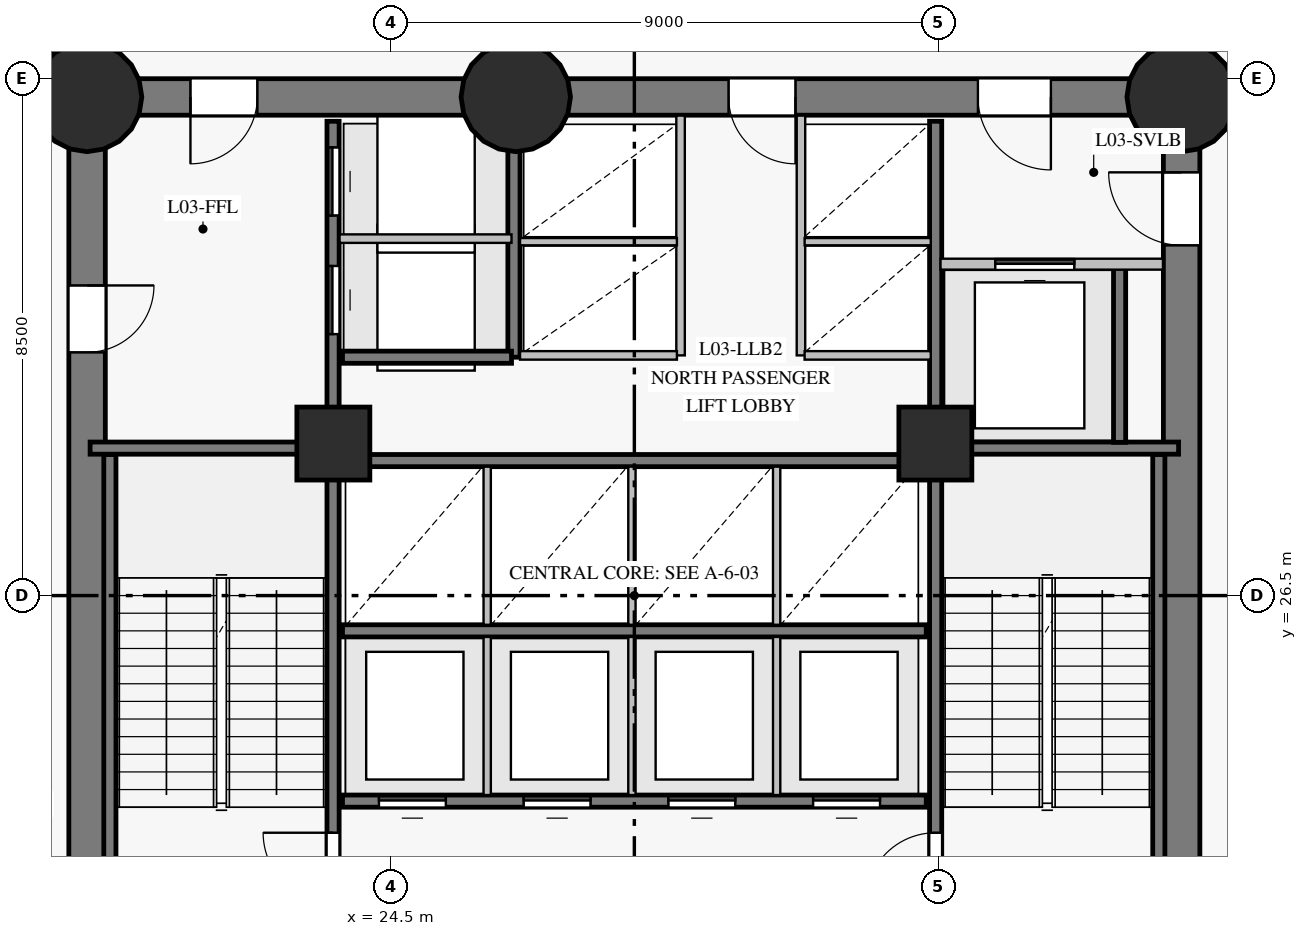
"""IFC4 building model, lengths in metres.
Left out: names, types, materials, properties, quantities, classifications, styles, units other than length and angle.
Written with IfcOpenShell. Run it as: python <this file> out.ifc"""

import sys

from ifc_helpers import new_model, si_unit, direction, frame, frame_2d, origin, origin_with_axes, origin_2d, place, context, subcontext, project, spatial, rectangle, circle, extrude, source, transform, mapped, element, fill, save


model = new_model("IFC4")
c1 = context("Model", 3, precision=1e-05, world=origin(), true_north=direction((0.0, 1.0)))
c2 = subcontext(c1, "Body", "Model", "MODEL_VIEW")
j1 = project(units=[si_unit("LENGTHUNIT", "METRE"), si_unit("PLANEANGLEUNIT", "RADIAN")], contexts=[c1])
p1 = place(None, origin())
s1 = spatial("IfcSite", under=j1, at=p1, CompositionType="ELEMENT")
p2 = place(p1, origin())
s2 = spatial("IfcBuilding", under=s1, at=p2, CompositionType="ELEMENT")
p3 = place(p2, frame((0.0, 0.0, 13.5)))
s3 = spatial("IfcBuildingStorey", under=s2, at=p3, CompositionType="ELEMENT", Elevation=13.5)
p4 = place(p3, frame((37.5, 18.3, 0.0), z_axis=(0.0, 0.0, 1.0), x_axis=(0.0, 1.0, 0.0)))
e1 = element("IfcWall", 1, at=p4, inside=s3, PredefinedType="SHEAR", context=c2, shape_type="SweptSolid", body=[
    extrude(rectangle(XDim=16.4, YDim=0.6, at=frame_2d((8.2, 0.0))), origin(), (0.0, 0.0, 1.0), 4.225),
])
p5 = place(p4, frame((13.96, 0.0, 0.0)))
e2 = element("IfcOpeningElement", 2, at=p5, cuts=e1, PredefinedType="OPENING", context=c2, shape_type="SweptSolid", body=[
    extrude(rectangle(XDim=1.2, YDim=2.15, at=frame_2d((0.6, 1.075))), frame((0.0, 0.31, 0.0), z_axis=(0.0, -1.0, 0.0), x_axis=(1.0, 0.0, 0.0)), (0.0, 0.0, 1.0), 0.62),
])
p6 = place(p3, frame((37.5, 34.7, 0.0), z_axis=(0.0, 0.0, 1.0), x_axis=(-1.0, 0.0, 0.0)))
e3 = element("IfcWall", 3, at=p6, inside=s3, PredefinedType="SHEAR", context=c2, shape_type="SweptSolid", body=[
    extrude(rectangle(XDim=10.95, YDim=0.6, at=frame_2d((5.475, 0.0))), origin(), (0.0, 0.0, 1.0), 4.225),
])
p7 = place(p6, frame((2.15, 0.0, 0.0)))
e4 = element("IfcOpeningElement", 4, at=p7, cuts=e3, PredefinedType="OPENING", context=c2, shape_type="SweptSolid", body=[
    extrude(rectangle(XDim=1.2, YDim=2.15, at=frame_2d((0.6, 1.075))), frame((0.0, 0.31, 0.0), z_axis=(0.0, -1.0, 0.0), x_axis=(1.0, 0.0, 0.0)), (0.0, 0.0, 1.0), 0.62),
])
p8 = place(p6, frame((6.35, 0.0, 0.0)))
e5 = element("IfcOpeningElement", 5, at=p8, cuts=e3, PredefinedType="OPENING", context=c2, shape_type="SweptSolid", body=[
    extrude(rectangle(XDim=1.1, YDim=2.15, at=frame_2d((0.55, 1.075))), frame((0.0, 0.31, 0.0), z_axis=(0.0, -1.0, 0.0), x_axis=(1.0, 0.0, 0.0)), (0.0, 0.0, 1.0), 0.62),
])
p9 = place(p3, frame((26.55, 34.7, 0.0), z_axis=(0.0, 0.0, 1.0), x_axis=(-1.0, 0.0, 0.0)))
e6 = element("IfcWall", 6, at=p9, inside=s3, PredefinedType="SHEAR", context=c2, shape_type="SweptSolid", body=[
    extrude(rectangle(XDim=7.05, YDim=0.6, at=frame_2d((3.525, 0.0))), origin(), (0.0, 0.0, 1.0), 4.225),
])
p10 = place(p9, frame((4.25, 0.0, 0.0)))
e7 = element("IfcOpeningElement", 7, at=p10, cuts=e6, PredefinedType="OPENING", context=c2, shape_type="SweptSolid", body=[
    extrude(rectangle(XDim=1.1, YDim=2.15, at=frame_2d((0.55, 1.075))), frame((0.0, 0.31, 0.0), z_axis=(0.0, -1.0, 0.0), x_axis=(1.0, 0.0, 0.0)), (0.0, 0.0, 1.0), 0.62),
])
p11 = place(p3, frame((19.5, 34.7, 0.0), z_axis=(0.0, 0.0, 1.0), x_axis=(0.0, -1.0, 0.0)))
e8 = element("IfcWall", 8, at=p11, inside=s3, PredefinedType="SHEAR", context=c2, shape_type="SweptSolid", body=[
    extrude(rectangle(XDim=16.4, YDim=0.6, at=frame_2d((8.2, 0.0))), origin(), (0.0, 0.0, 1.0), 4.225),
])
p12 = place(p11, frame((3.1, 0.0, 0.0)))
e9 = element("IfcOpeningElement", 9, at=p12, cuts=e8, PredefinedType="OPENING", context=c2, shape_type="SweptSolid", body=[
    extrude(rectangle(XDim=1.1, YDim=2.15, at=frame_2d((0.55, 1.075))), frame((0.0, 0.31, 0.0), z_axis=(0.0, -1.0, 0.0), x_axis=(1.0, 0.0, 0.0)), (0.0, 0.0, 1.0), 0.62),
])
m1 = source(origin_with_axes(), c2, "Body", "SweptSolid", [
    extrude(circle(Radius=0.9, at=origin_2d()), origin(), (0.0, 0.0, 1.0), 4.5),
])
for number, where, z_axis, x_axis in (
    (10, (19.5, 34.7, 0.0), (0.0, 0.0, 1.0), (1.0, 0.0, 0.0)),
    (11, (26.55, 34.7, 0.0), (0.0, 0.0, 1.0), (1.0, 0.0, 0.0)),
    (12, (37.5, 34.7, 0.0), (0.0, 0.0, 1.0), (1.0, 0.0, 0.0)),
):
    element("IfcColumn", number, at=place(p3, frame(where, z_axis=z_axis, x_axis=x_axis)), inside=s3, PredefinedType="COLUMN", context=c2, shape_type="MappedRepresentation", body=[
        mapped(m1, transform((0.0, 0.0, 0.0), scale=1.0)),
    ])
m2 = source(origin_with_axes(), c2, "Body", "SweptSolid", [
    extrude(rectangle(XDim=1.2, YDim=1.2, at=origin_2d()), origin(), (0.0, 0.0, 1.0), 4.5),
])
for number, where, z_axis, x_axis in (
    (13, (23.55, 29.0, 0.0), (0.0, 0.0, 1.0), (1.0, 0.0, 0.0)),
    (14, (33.45, 29.0, 0.0), (0.0, 0.0, 1.0), (1.0, 0.0, 0.0)),
):
    element("IfcColumn", number, at=place(p3, frame(where, z_axis=z_axis, x_axis=x_axis)), inside=s3, PredefinedType="COLUMN", context=c2, shape_type="MappedRepresentation", body=[
        mapped(m2, transform((0.0, 0.0, 0.0), scale=1.0)),
    ])
p13 = place(p3, frame((23.545, 18.7, 0.0), z_axis=(0.0, 0.0, 1.0), x_axis=(0.0, 1.0, 0.0)))
e15 = element("IfcWall", 15, at=p13, inside=s3, PredefinedType="SHEAR", context=c2, shape_type="SweptSolid", body=[
    extrude(rectangle(XDim=15.6, YDim=0.2, at=frame_2d((7.8, 0.0))), origin(), (0.0, 0.0, 1.0), 4.225),
])
p14 = place(p13, frame((2.75, 0.0, 0.0)))
e16 = element("IfcOpeningElement", 16, at=p14, cuts=e15, PredefinedType="OPENING", context=c2, shape_type="SweptSolid", body=[
    extrude(rectangle(XDim=1.15, YDim=2.15, at=frame_2d((0.575, 1.075))), frame((0.0, 0.11, 0.0), z_axis=(0.0, -1.0, 0.0), x_axis=(1.0, 0.0, 0.0)), (0.0, 0.0, 1.0), 0.22),
])
p15 = place(p13, frame((0.14, 0.0, 0.0)))
e17 = element("IfcOpeningElement", 17, at=p15, cuts=e15, PredefinedType="OPENING", context=c2, shape_type="SweptSolid", body=[
    extrude(rectangle(XDim=0.88, YDim=2.1, at=frame_2d((0.44, 1.05))), frame((0.0, 0.11, 0.0), z_axis=(0.0, -1.0, 0.0), x_axis=(1.0, 0.0, 0.0)), (0.0, 0.0, 1.0), 0.22),
])
p16 = place(p13, frame((1.36, 0.0, 0.0)))
e18 = element("IfcOpeningElement", 18, at=p16, cuts=e15, PredefinedType="OPENING", context=c2, shape_type="SweptSolid", body=[
    extrude(rectangle(XDim=0.88, YDim=2.1, at=frame_2d((0.44, 1.05))), frame((0.0, 0.11, 0.0), z_axis=(0.0, -1.0, 0.0), x_axis=(1.0, 0.0, 0.0)), (0.0, 0.0, 1.0), 0.22),
])
p17 = place(p13, frame((12.1, 0.0, 0.0)))
e19 = element("IfcOpeningElement", 19, at=p17, cuts=e15, PredefinedType="OPENING", context=c2, shape_type="SweptSolid", body=[
    extrude(rectangle(XDim=1.12, YDim=2.15, at=frame_2d((0.56, 1.075))), frame((0.0, 0.11, 0.0), z_axis=(0.0, -1.0, 0.0), x_axis=(1.0, 0.0, 0.0)), (0.0, 0.0, 1.0), 0.22),
])
p18 = place(p13, frame((14.05, 0.0, 0.0)))
e20 = element("IfcOpeningElement", 20, at=p18, cuts=e15, PredefinedType="OPENING", context=c2, shape_type="SweptSolid", body=[
    extrude(rectangle(XDim=1.12, YDim=2.15, at=frame_2d((0.56, 1.075))), frame((0.0, 0.11, 0.0), z_axis=(0.0, -1.0, 0.0), x_axis=(1.0, 0.0, 0.0)), (0.0, 0.0, 1.0), 0.22),
])
p19 = place(p3, frame((33.455, 18.7, 0.0), z_axis=(0.0, 0.0, 1.0), x_axis=(0.0, 1.0, 0.0)))
e21 = element("IfcWall", 21, at=p19, inside=s3, PredefinedType="SHEAR", context=c2, shape_type="SweptSolid", body=[
    extrude(rectangle(XDim=15.6, YDim=0.2, at=frame_2d((7.8, 0.0))), origin(), (0.0, 0.0, 1.0), 4.225),
])
p20 = place(p19, frame((2.75, 0.0, 0.0)))
e22 = element("IfcOpeningElement", 22, at=p20, cuts=e21, PredefinedType="OPENING", context=c2, shape_type="SweptSolid", body=[
    extrude(rectangle(XDim=1.15, YDim=2.15, at=frame_2d((0.575, 1.075))), frame((0.0, 0.11, 0.0), z_axis=(0.0, -1.0, 0.0), x_axis=(1.0, 0.0, 0.0)), (0.0, 0.0, 1.0), 0.22),
])
p21 = place(p19, frame((0.55, 0.0, 0.0)))
e23 = element("IfcOpeningElement", 23, at=p21, cuts=e21, PredefinedType="OPENING", context=c2, shape_type="SweptSolid", body=[
    extrude(rectangle(XDim=0.94, YDim=2.1, at=frame_2d((0.47, 1.05))), frame((0.0, 0.11, 0.0), z_axis=(0.0, -1.0, 0.0), x_axis=(1.0, 0.0, 0.0)), (0.0, 0.0, 1.0), 0.22),
])
p22 = place(p3, frame((23.7, 23.12, 0.0), z_axis=(0.0, 0.0, 1.0), x_axis=(1.0, 0.0, 0.0)))
e24 = element("IfcWall", 24, at=p22, inside=s3, PredefinedType="SHEAR", context=c2, shape_type="SweptSolid", body=[
    extrude(rectangle(XDim=9.6, YDim=0.2, at=frame_2d((4.8, 0.0))), origin(), (0.0, 0.0, 1.0), 4.225),
])
p23 = place(p22, frame((0.6, 0.0, 0.0)))
e25 = element("IfcOpeningElement", 25, at=p23, cuts=e24, PredefinedType="OPENING", context=c2, shape_type="SweptSolid", body=[
    extrude(rectangle(XDim=1.1, YDim=2.15, at=frame_2d((0.55, 1.075))), frame((0.0, 0.11, 0.0), z_axis=(0.0, -1.0, 0.0), x_axis=(1.0, 0.0, 0.0)), (0.0, 0.0, 1.0), 0.22),
])
p24 = place(p22, frame((2.98, 0.0, 0.0)))
e26 = element("IfcOpeningElement", 26, at=p24, cuts=e24, PredefinedType="OPENING", context=c2, shape_type="SweptSolid", body=[
    extrude(rectangle(XDim=1.1, YDim=2.15, at=frame_2d((0.55, 1.075))), frame((0.0, 0.11, 0.0), z_axis=(0.0, -1.0, 0.0), x_axis=(1.0, 0.0, 0.0)), (0.0, 0.0, 1.0), 0.22),
])
p25 = place(p22, frame((5.36, 0.0, 0.0)))
e27 = element("IfcOpeningElement", 27, at=p25, cuts=e24, PredefinedType="OPENING", context=c2, shape_type="SweptSolid", body=[
    extrude(rectangle(XDim=1.1, YDim=2.15, at=frame_2d((0.55, 1.075))), frame((0.0, 0.11, 0.0), z_axis=(0.0, -1.0, 0.0), x_axis=(1.0, 0.0, 0.0)), (0.0, 0.0, 1.0), 0.22),
])
p26 = place(p22, frame((7.74, 0.0, 0.0)))
e28 = element("IfcOpeningElement", 28, at=p26, cuts=e24, PredefinedType="OPENING", context=c2, shape_type="SweptSolid", body=[
    extrude(rectangle(XDim=1.1, YDim=2.15, at=frame_2d((0.55, 1.075))), frame((0.0, 0.11, 0.0), z_axis=(0.0, -1.0, 0.0), x_axis=(1.0, 0.0, 0.0)), (0.0, 0.0, 1.0), 0.22),
])
for number, where, z_axis, x_axis in (
    (29, (23.7, 25.92, 0.0), (0.0, 0.0, 1.0), (1.0, 0.0, 0.0)),
    (30, (23.7, 28.72, 0.0), (0.0, 0.0, 1.0), (1.0, 0.0, 0.0)),
):
    element("IfcWall", number, at=place(p3, frame(where, z_axis=z_axis, x_axis=x_axis)), inside=s3, PredefinedType="SHEAR", context=c2, shape_type="SweptSolid", body=[
        extrude(rectangle(XDim=9.6, YDim=0.2, at=frame_2d((4.8, 0.0))), origin(), (0.0, 0.0, 1.0), 4.225),
    ])
for number, where, z_axis, x_axis in (
    (31, (19.875, 21.32, 0.0), (0.0, 0.0, 1.0), (0.0, 1.0, 0.0)),
    (32, (37.125, 21.32, 0.0), (0.0, 0.0, 1.0), (0.0, 1.0, 0.0)),
):
    element("IfcWall", number, at=place(p3, frame(where, z_axis=z_axis, x_axis=x_axis)), inside=s3, PredefinedType="SHEAR", context=c2, shape_type="SweptSolid", body=[
        extrude(rectangle(XDim=7.5, YDim=0.2, at=frame_2d((3.75, 0.0))), origin(), (0.0, 0.0, 1.0), 4.225),
    ])
for number, where, z_axis, x_axis in (
    (33, (33.455, 28.925, 0.0), (0.0, 0.0, 1.0), (1.0, 0.0, 0.0)),
    (34, (19.55, 28.925, 0.0), (0.0, 0.0, 1.0), (1.0, 0.0, 0.0)),
):
    element("IfcWall", number, at=place(p3, frame(where, z_axis=z_axis, x_axis=x_axis)), inside=s3, PredefinedType="SHEAR", context=c2, shape_type="SweptSolid", body=[
        extrude(rectangle(XDim=3.995, YDim=0.2, at=frame_2d((1.998, 0.0))), origin(), (0.0, 0.0, 1.0), 4.225),
    ])
p27 = place(p3, frame((26.52, 30.42, 0.0), z_axis=(0.0, 0.0, 1.0), x_axis=(0.0, 1.0, 0.0)))
e35 = element("IfcWall", 35, at=p27, inside=s3, PredefinedType="SHEAR", context=c2, shape_type="SweptSolid", body=[
    extrude(rectangle(XDim=3.86, YDim=0.2, at=frame_2d((1.93, 0.0))), origin(), (0.0, 0.0, 1.0), 4.225),
])
p28 = place(p3, frame((36.48, 29.02, 0.0), z_axis=(0.0, 0.0, 1.0), x_axis=(0.0, 1.0, 0.0)))
e36 = element("IfcWall", 36, at=p28, inside=s3, PredefinedType="SHEAR", context=c2, shape_type="SweptSolid", body=[
    extrude(rectangle(XDim=2.86, YDim=0.2, at=frame_2d((1.43, 0.0))), origin(), (0.0, 0.0, 1.0), 4.225),
])
p29 = place(p3, frame((23.7, 30.42, 0.0), z_axis=(0.0, 0.0, 1.0), x_axis=(1.0, 0.0, 0.0)))
e37 = element("IfcWall", 37, at=p29, inside=s3, PredefinedType="SHEAR", context=c2, shape_type="SweptSolid", body=[
    extrude(rectangle(XDim=2.78, YDim=0.2, at=frame_2d((1.39, 0.0))), origin(), (0.0, 0.0, 1.0), 4.225),
])
for number, where, z_axis, x_axis in (
    (38, (29.26, 30.45, 0.0), (0.0, 0.0, 1.0), (0.0, 1.0, 0.0)),
    (39, (31.24, 30.45, 0.0), (0.0, 0.0, 1.0), (0.0, 1.0, 0.0)),
):
    element("IfcWall", number, at=place(p3, frame(where, z_axis=z_axis, x_axis=x_axis)), inside=s3, PredefinedType="PARTITIONING", context=c2, shape_type="SweptSolid", body=[
        extrude(rectangle(XDim=3.943, YDim=0.14, at=frame_2d((1.972, 0.0))), origin(), (0.0, 0.0, 1.0), 4.225),
    ])
p30 = place(p3, frame((33.535, 31.95, 0.0), z_axis=(0.0, 0.0, 1.0), x_axis=(1.0, 0.0, 0.0)))
e40 = element("IfcWall", 40, at=p30, inside=s3, PredefinedType="PARTITIONING", context=c2, shape_type="SweptSolid", body=[
    extrude(rectangle(XDim=3.658, YDim=0.18, at=frame_2d((1.829, 0.0))), origin(), (0.0, 0.0, 1.0), 4.225),
])
p31 = place(p30, frame((0.9, 0.0, 0.0)))
e41 = element("IfcOpeningElement", 41, at=p31, cuts=e40, PredefinedType="OPENING", context=c2, shape_type="SweptSolid", body=[
    extrude(rectangle(XDim=1.3, YDim=2.2, at=frame_2d((0.65, 1.1))), frame((0.0, 0.1, 0.0), z_axis=(0.0, -1.0, 0.0), x_axis=(1.0, 0.0, 0.0)), (0.0, 0.0, 1.0), 0.2),
])
p32 = place(p3, frame((23.652, 32.37, 0.0), z_axis=(0.0, 0.0, 1.0), x_axis=(1.0, 0.0, 0.0)))
e42 = element("IfcWall", 42, at=p32, inside=s3, PredefinedType="PARTITIONING", context=c2, shape_type="SweptSolid", body=[
    extrude(rectangle(XDim=2.828, YDim=0.14, at=frame_2d((1.414, 0.0))), origin(), (0.0, 0.0, 1.0), 4.225),
])
for number, where, z_axis, x_axis in (
    (43, (26.08, 23.22, 0.0), (0.0, 0.0, 1.0), (0.0, 1.0, 0.0)),
    (44, (28.46, 23.22, 0.0), (0.0, 0.0, 1.0), (0.0, 1.0, 0.0)),
    (45, (30.84, 23.22, 0.0), (0.0, 0.0, 1.0), (0.0, 1.0, 0.0)),
    (46, (26.08, 26.02, 0.0), (0.0, 0.0, 1.0), (0.0, 1.0, 0.0)),
    (47, (28.46, 26.02, 0.0), (0.0, 0.0, 1.0), (0.0, 1.0, 0.0)),
    (48, (30.84, 26.02, 0.0), (0.0, 0.0, 1.0), (0.0, 1.0, 0.0)),
):
    element("IfcWall", number, at=place(p3, frame(where, z_axis=z_axis, x_axis=x_axis)), inside=s3, PredefinedType="PARTITIONING", context=c2, shape_type="SweptSolid", body=[
        extrude(rectangle(XDim=2.6, YDim=0.12, at=frame_2d((1.3, 0.0))), origin(), (0.0, 0.0, 1.0), 4.225),
    ])
p33 = place(p3, frame((26.62, 30.45, 0.0), z_axis=(0.0, 0.0, 1.0), x_axis=(1.0, 0.0, 0.0)))
e49 = element("IfcWall", 49, at=p33, inside=s3, PredefinedType="PARTITIONING", context=c2, shape_type="SweptSolid", body=[
    extrude(rectangle(XDim=2.58, YDim=0.14, at=frame_2d((1.29, 0.0))), origin(), (0.0, 0.0, 1.0), 4.225),
])
p34 = place(p3, frame((26.62, 32.32, 0.0), z_axis=(0.0, 0.0, 1.0), x_axis=(1.0, 0.0, 0.0)))
e50 = element("IfcWall", 50, at=p34, inside=s3, PredefinedType="PARTITIONING", context=c2, shape_type="SweptSolid", body=[
    extrude(rectangle(XDim=2.58, YDim=0.12, at=frame_2d((1.29, 0.0))), origin(), (0.0, 0.0, 1.0), 4.225),
])
p35 = place(p3, frame((31.3, 30.45, 0.0), z_axis=(0.0, 0.0, 1.0), x_axis=(1.0, 0.0, 0.0)))
e51 = element("IfcWall", 51, at=p35, inside=s3, PredefinedType="PARTITIONING", context=c2, shape_type="SweptSolid", body=[
    extrude(rectangle(XDim=2.075, YDim=0.14, at=frame_2d((1.038, 0.0))), origin(), (0.0, 0.0, 1.0), 4.225),
])
p36 = place(p3, frame((31.3, 32.32, 0.0), z_axis=(0.0, 0.0, 1.0), x_axis=(1.0, 0.0, 0.0)))
e52 = element("IfcWall", 52, at=p36, inside=s3, PredefinedType="PARTITIONING", context=c2, shape_type="SweptSolid", body=[
    extrude(rectangle(XDim=2.075, YDim=0.12, at=frame_2d((1.038, 0.0))), origin(), (0.0, 0.0, 1.0), 4.225),
])
m3 = source(origin_with_axes(), c2, "Body", "SweptSolid", [
    extrude(rectangle(XDim=1.15, YDim=2.15, at=frame_2d((0.575, 1.075))), frame((0.0, 0.025, 0.0), z_axis=(0.0, -1.0, 0.0), x_axis=(1.0, 0.0, 0.0)), (0.0, 0.0, 1.0), 0.05),
])
p37 = place(p14, origin())
e53 = element("IfcDoor", 53, at=p37, inside=s3, OperationType="SINGLE_SWING_RIGHT", PredefinedType="DOOR", context=c2, shape_type="MappedRepresentation", body=[
    mapped(m3, transform((0.0, 0.0, 0.0), scale=1.0)),
])
fill(e16, e53)
p38 = place(p20, origin())
e54 = element("IfcDoor", 54, at=p38, inside=s3, OperationType="SINGLE_SWING_LEFT", PredefinedType="DOOR", context=c2, shape_type="MappedRepresentation", body=[
    mapped(m3, transform((0.0, 0.0, 0.0), scale=1.0)),
])
fill(e22, e54)
m4 = source(origin_with_axes(), c2, "Body", "SweptSolid", [
    extrude(rectangle(XDim=1.1, YDim=2.15, at=frame_2d((0.55, 1.075))), frame((0.0, 0.025, 0.0), z_axis=(0.0, -1.0, 0.0), x_axis=(1.0, 0.0, 0.0)), (0.0, 0.0, 1.0), 0.05),
])
p39 = place(p10, origin())
e55 = element("IfcDoor", 55, at=p39, inside=s3, OperationType="SINGLE_SWING_RIGHT", PredefinedType="DOOR", context=c2, shape_type="MappedRepresentation", body=[
    mapped(m4, transform((0.0, 0.0, 0.0), scale=1.0)),
])
fill(e7, e55)
p40 = place(p12, origin())
e56 = element("IfcDoor", 56, at=p40, inside=s3, OperationType="SINGLE_SWING_LEFT", PredefinedType="DOOR", context=c2, shape_type="MappedRepresentation", body=[
    mapped(m4, transform((0.0, 0.0, 0.0), scale=1.0)),
])
fill(e9, e56)
m5 = source(origin_with_axes(), c2, "Body", "SweptSolid", [
    extrude(rectangle(XDim=1.2, YDim=2.15, at=frame_2d((0.6, 1.075))), frame((0.0, 0.025, 0.0), z_axis=(0.0, -1.0, 0.0), x_axis=(1.0, 0.0, 0.0)), (0.0, 0.0, 1.0), 0.05),
])
p41 = place(p5, origin())
e57 = element("IfcDoor", 57, at=p41, inside=s3, OperationType="SINGLE_SWING_RIGHT", PredefinedType="DOOR", context=c2, shape_type="MappedRepresentation", body=[
    mapped(m5, transform((0.0, 0.0, 0.0), scale=1.0)),
])
fill(e2, e57)
p42 = place(p7, origin())
e58 = element("IfcDoor", 58, at=p42, inside=s3, OperationType="SINGLE_SWING_LEFT", PredefinedType="DOOR", context=c2, shape_type="MappedRepresentation", body=[
    mapped(m5, transform((0.0, 0.0, 0.0), scale=1.0)),
])
fill(e4, e58)
m6 = source(origin_with_axes(), c2, "Body", "SweptSolid", [
    extrude(rectangle(XDim=1.3, YDim=2.2, at=frame_2d((0.65, 1.1))), frame((0.0, 0.025, 0.0), z_axis=(0.0, -1.0, 0.0), x_axis=(1.0, 0.0, 0.0)), (0.0, 0.0, 1.0), 0.05),
])
p43 = place(p31, origin())
e59 = element("IfcDoor", 59, at=p43, inside=s3, OperationType="SLIDING_TO_LEFT", PredefinedType="DOOR", context=c2, shape_type="MappedRepresentation", body=[
    mapped(m6, transform((0.0, 0.0, 0.0), scale=1.0)),
])
fill(e41, e59)
p44 = place(p23, origin())
e60 = element("IfcDoor", 60, at=p44, inside=s3, OperationType="SLIDING_TO_LEFT", PredefinedType="DOOR", context=c2, shape_type="MappedRepresentation", body=[
    mapped(m4, transform((0.0, 0.0, 0.0), scale=1.0)),
])
fill(e25, e60)
p45 = place(p24, origin())
e61 = element("IfcDoor", 61, at=p45, inside=s3, OperationType="SLIDING_TO_RIGHT", PredefinedType="DOOR", context=c2, shape_type="MappedRepresentation", body=[
    mapped(m4, transform((0.0, 0.0, 0.0), scale=1.0)),
])
fill(e26, e61)
p46 = place(p25, origin())
e62 = element("IfcDoor", 62, at=p46, inside=s3, OperationType="SLIDING_TO_LEFT", PredefinedType="DOOR", context=c2, shape_type="MappedRepresentation", body=[
    mapped(m4, transform((0.0, 0.0, 0.0), scale=1.0)),
])
fill(e27, e62)
p47 = place(p26, origin())
e63 = element("IfcDoor", 63, at=p47, inside=s3, OperationType="SLIDING_TO_RIGHT", PredefinedType="DOOR", context=c2, shape_type="MappedRepresentation", body=[
    mapped(m4, transform((0.0, 0.0, 0.0), scale=1.0)),
])
fill(e28, e63)
p48 = place(p8, origin())
e64 = element("IfcDoor", 64, at=p48, inside=s3, OperationType="SINGLE_SWING_LEFT", PredefinedType="DOOR", context=c2, shape_type="MappedRepresentation", body=[
    mapped(m4, transform((0.0, 0.0, 0.0), scale=1.0)),
])
fill(e5, e64)
m7 = source(origin_with_axes(), c2, "Body", "SweptSolid", [
    extrude(rectangle(XDim=1.12, YDim=2.15, at=frame_2d((0.56, 1.075))), frame((0.0, 0.025, 0.0), z_axis=(0.0, -1.0, 0.0), x_axis=(1.0, 0.0, 0.0)), (0.0, 0.0, 1.0), 0.05),
])
p49 = place(p17, origin())
e65 = element("IfcDoor", 65, at=p49, inside=s3, OperationType="SLIDING_TO_LEFT", PredefinedType="DOOR", context=c2, shape_type="MappedRepresentation", body=[
    mapped(m7, transform((0.0, 0.0, 0.0), scale=1.0)),
])
fill(e19, e65)
p50 = place(p18, origin())
e66 = element("IfcDoor", 66, at=p50, inside=s3, OperationType="SLIDING_TO_RIGHT", PredefinedType="DOOR", context=c2, shape_type="MappedRepresentation", body=[
    mapped(m7, transform((0.0, 0.0, 0.0), scale=1.0)),
])
fill(e20, e66)
save(model, sys.argv[1])
